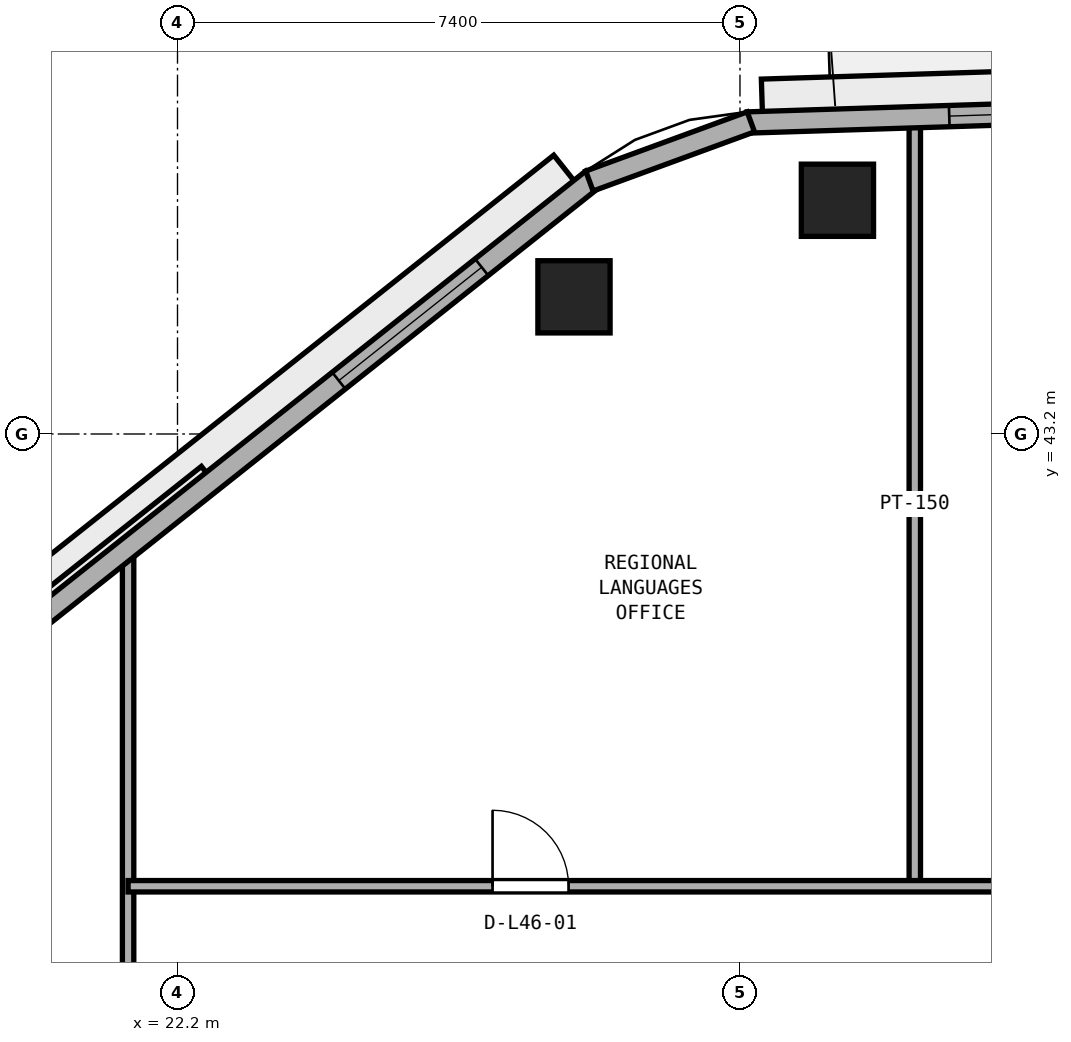
"""IFC4 building model, lengths in metres.
Left out: names, types, materials, properties, quantities, classifications, styles, units other than length and angle.
Written with IfcOpenShell. Run it as: python <this file> out.ifc"""

import sys

from ifc_helpers import new_model, si_unit, direction, frame, frame_2d, origin, origin_2d, place, context, subcontext, project, spatial, rectangle, extrude, element, fill, save


model = new_model("IFC4")
c1 = context("Model", 3, precision=1e-05, world=origin(), true_north=direction((0.0, 1.0)))
c2 = subcontext(c1, "Body", "Model", "MODEL_VIEW")
j1 = project(units=[si_unit("LENGTHUNIT", "METRE"), si_unit("PLANEANGLEUNIT", "RADIAN")], contexts=[c1])
p1 = place(None, origin())
s1 = spatial("IfcSite", under=j1, at=p1, CompositionType="ELEMENT")
p2 = place(p1, origin())
s2 = spatial("IfcBuilding", under=s1, at=p2, CompositionType="ELEMENT")
p3 = place(p2, frame((0.0, 0.0, 182.0)))
s3 = spatial("IfcBuildingStorey", under=s2, at=p3, CompositionType="ELEMENT", Elevation=182.0)
for number, where, z_axis, x_axis in (
    (1, (30.882, 46.275, 0.0), (0.0, 0.0, 1.0), (1.0, 0.0, 0.0)),
    (2, (27.416, 45.004, 0.0), (0.0, 0.0, 1.0), (1.0, 0.0, 0.0)),
):
    element("IfcColumn", number, at=place(p3, frame(where, z_axis=z_axis, x_axis=x_axis)), inside=s3, PredefinedType="COLUMN", context=c2, shape_type="SweptSolid", body=[
        extrude(rectangle(XDim=0.95, YDim=0.95, at=origin_2d()), origin(), (0.0, 0.0, 1.0), 3.8),
    ])
p4 = place(p3, frame((31.9, 37.25, 0.0), z_axis=(0.0, 0.0, 1.0), x_axis=(0.0, 1.0, 0.0)))
e3 = element("IfcWall", 3, at=p4, inside=s3, PredefinedType="PARTITIONING", context=c2, shape_type="SweptSolid", body=[
    extrude(rectangle(XDim=10.053, YDim=0.15, at=frame_2d((5.026, 0.0))), origin(), (0.0, 0.0, 1.0), 3.54),
])
p5 = place(p3, frame((21.55, 26.55, 0.0), z_axis=(0.0, 0.0, 1.0), x_axis=(0.0, 1.0, 0.0)))
e4 = element("IfcWall", 4, at=p5, inside=s3, PredefinedType="PARTITIONING", context=c2, shape_type="SweptSolid", body=[
    extrude(rectangle(XDim=15.19, YDim=0.15, at=frame_2d((7.595, 0.0))), origin(), (0.0, 0.0, 1.0), 3.54),
])
p6 = place(p5, frame((7.975, 0.0, 0.0)))
e5 = element("IfcOpeningElement", 5, at=p6, cuts=e4, PredefinedType="OPENING", context=c2, shape_type="SweptSolid", body=[
    extrude(rectangle(XDim=0.9, YDim=2.1, at=frame_2d((0.45, 1.05))), frame((0.0, 0.085, 0.0), z_axis=(0.0, -1.0, 0.0), x_axis=(1.0, 0.0, 0.0)), (0.0, 0.0, 1.0), 0.17),
])
p7 = place(p3, frame((21.55, 37.25, 0.0), z_axis=(0.0, 0.0, 1.0), x_axis=(1.0, 0.0, 0.0)))
e6 = element("IfcWall", 6, at=p7, inside=s3, PredefinedType="PARTITIONING", context=c2, shape_type="SweptSolid", body=[
    extrude(rectangle(XDim=12.85, YDim=0.15, at=frame_2d((6.425, 0.0))), origin(), (0.0, 0.0, 1.0), 3.54),
])
p8 = place(p7, frame((4.795, 0.0, 0.0)))
e7 = element("IfcOpeningElement", 7, at=p8, cuts=e6, PredefinedType="OPENING", context=c2, shape_type="SweptSolid", body=[
    extrude(rectangle(XDim=1.0, YDim=2.12, at=frame_2d((0.5, 1.06))), frame((0.0, 0.085, 0.0), z_axis=(0.0, -1.0, 0.0), x_axis=(1.0, 0.0, 0.0)), (0.0, 0.0, 1.0), 0.17),
])
p9 = place(p3, frame((46.143, 47.82, 0.0), z_axis=(0.0, 0.0, 1.0), x_axis=(-0.999497065256, -0.031711457627, 0.0)))
e8 = element("IfcWall", 8, at=p9, inside=s3, PredefinedType="STANDARD", context=c2, shape_type="SweptSolid", body=[
    extrude(rectangle(XDim=16.452, YDim=0.28, at=frame_2d((8.226, 0.0))), origin(), (0.0, 0.0, 1.0), 3.54),
])
p10 = place(p9, frame((7.676, 0.0, 0.0)))
e9 = element("IfcOpeningElement", 9, at=p10, cuts=e8, PredefinedType="OPENING", context=c2, shape_type="SweptSolid", body=[
    extrude(rectangle(XDim=1.1, YDim=2.2, at=frame_2d((0.55, 1.1))), frame((0.0, 0.15, 0.0), z_axis=(0.0, -1.0, 0.0), x_axis=(1.0, 0.0, 0.0)), (0.0, 0.0, 1.0), 0.3),
])
p11 = place(p9, frame((1.875, 0.0, 0.9)))
e10 = element("IfcOpeningElement", 10, at=p11, cuts=e8, PredefinedType="OPENING", context=c2, shape_type="SweptSolid", body=[
    extrude(rectangle(XDim=2.4, YDim=1.75, at=frame_2d((1.2, 0.875))), frame((0.0, 0.15, 0.0), z_axis=(0.0, -1.0, 0.0), x_axis=(1.0, 0.0, 0.0)), (0.0, 0.0, 1.0), 0.3),
])
p12 = place(p9, frame((11.397, 0.0, 0.9)))
e11 = element("IfcOpeningElement", 11, at=p12, cuts=e8, PredefinedType="OPENING", context=c2, shape_type="SweptSolid", body=[
    extrude(rectangle(XDim=2.4, YDim=1.75, at=frame_2d((1.2, 0.875))), frame((0.0, 0.15, 0.0), z_axis=(0.0, -1.0, 0.0), x_axis=(1.0, 0.0, 0.0)), (0.0, 0.0, 1.0), 0.3),
])
p13 = place(p3, frame((27.658, 46.55, 0.0), z_axis=(0.0, 0.0, 1.0), x_axis=(-0.783266285861, -0.621686356158, 0.0)))
e12 = element("IfcWall", 12, at=p13, inside=s3, PredefinedType="STANDARD", context=c2, shape_type="SweptSolid", body=[
    extrude(rectangle(XDim=16.353, YDim=0.28, at=frame_2d((8.177, 0.0))), origin(), (0.0, 0.0, 1.0), 3.54),
])
p14 = place(p13, frame((1.859, 0.0, 0.9)))
e13 = element("IfcOpeningElement", 13, at=p14, cuts=e12, PredefinedType="OPENING", context=c2, shape_type="SweptSolid", body=[
    extrude(rectangle(XDim=2.4, YDim=1.75, at=frame_2d((1.2, 0.875))), frame((0.0, 0.15, 0.0), z_axis=(0.0, -1.0, 0.0), x_axis=(1.0, 0.0, 0.0)), (0.0, 0.0, 1.0), 0.3),
])
p15 = place(p13, frame((12.094, 0.0, 0.9)))
e14 = element("IfcOpeningElement", 14, at=p15, cuts=e12, PredefinedType="OPENING", context=c2, shape_type="SweptSolid", body=[
    extrude(rectangle(XDim=2.4, YDim=1.75, at=frame_2d((1.2, 0.875))), frame((0.0, 0.15, 0.0), z_axis=(0.0, -1.0, 0.0), x_axis=(1.0, 0.0, 0.0)), (0.0, 0.0, 1.0), 0.3),
])
p16 = place(p3, frame((29.743, 47.306, 0.0), z_axis=(0.0, 0.0, 1.0), x_axis=(-0.93893328381, -0.344099242302, 0.0)))
e15 = element("IfcWall", 15, at=p16, inside=s3, PredefinedType="STANDARD", context=c2, shape_type="SweptSolid", body=[
    extrude(rectangle(XDim=2.262, YDim=0.28, at=frame_2d((1.131, 0.0))), origin(), (0.0, 0.0, 1.0), 3.54),
])
p17 = place(p8, origin())
e16 = element("IfcDoor", 16, at=p17, inside=s3, OperationType="SINGLE_SWING_LEFT", PredefinedType="DOOR", context=c2, shape_type="SweptSolid", body=[
    extrude(rectangle(XDim=1.0, YDim=2.12, at=frame_2d((0.5, 1.06))), frame((0.0, 0.025, 0.0), z_axis=(0.0, -1.0, 0.0), x_axis=(1.0, 0.0, 0.0)), (0.0, 0.0, 1.0), 0.05),
])
fill(e7, e16)
p18 = place(p12, origin())
e17 = element("IfcWindow", 17, at=p18, inside=s3, PartitioningType="SINGLE_PANEL", PredefinedType="WINDOW", context=c2, shape_type="SweptSolid", body=[
    extrude(rectangle(XDim=2.4, YDim=1.75, at=frame_2d((1.2, 0.875))), frame((0.0, 0.03, 0.0), z_axis=(0.0, -1.0, 0.0), x_axis=(1.0, 0.0, 0.0)), (0.0, 0.0, 1.0), 0.06),
])
fill(e11, e17)
p19 = place(p14, origin())
e18 = element("IfcWindow", 18, at=p19, inside=s3, PartitioningType="SINGLE_PANEL", PredefinedType="WINDOW", context=c2, shape_type="SweptSolid", body=[
    extrude(rectangle(XDim=2.4, YDim=1.75, at=frame_2d((1.2, 0.875))), frame((0.0, 0.03, 0.0), z_axis=(0.0, -1.0, 0.0), x_axis=(1.0, 0.0, 0.0)), (0.0, 0.0, 1.0), 0.06),
])
fill(e13, e18)
save(model, sys.argv[1])
